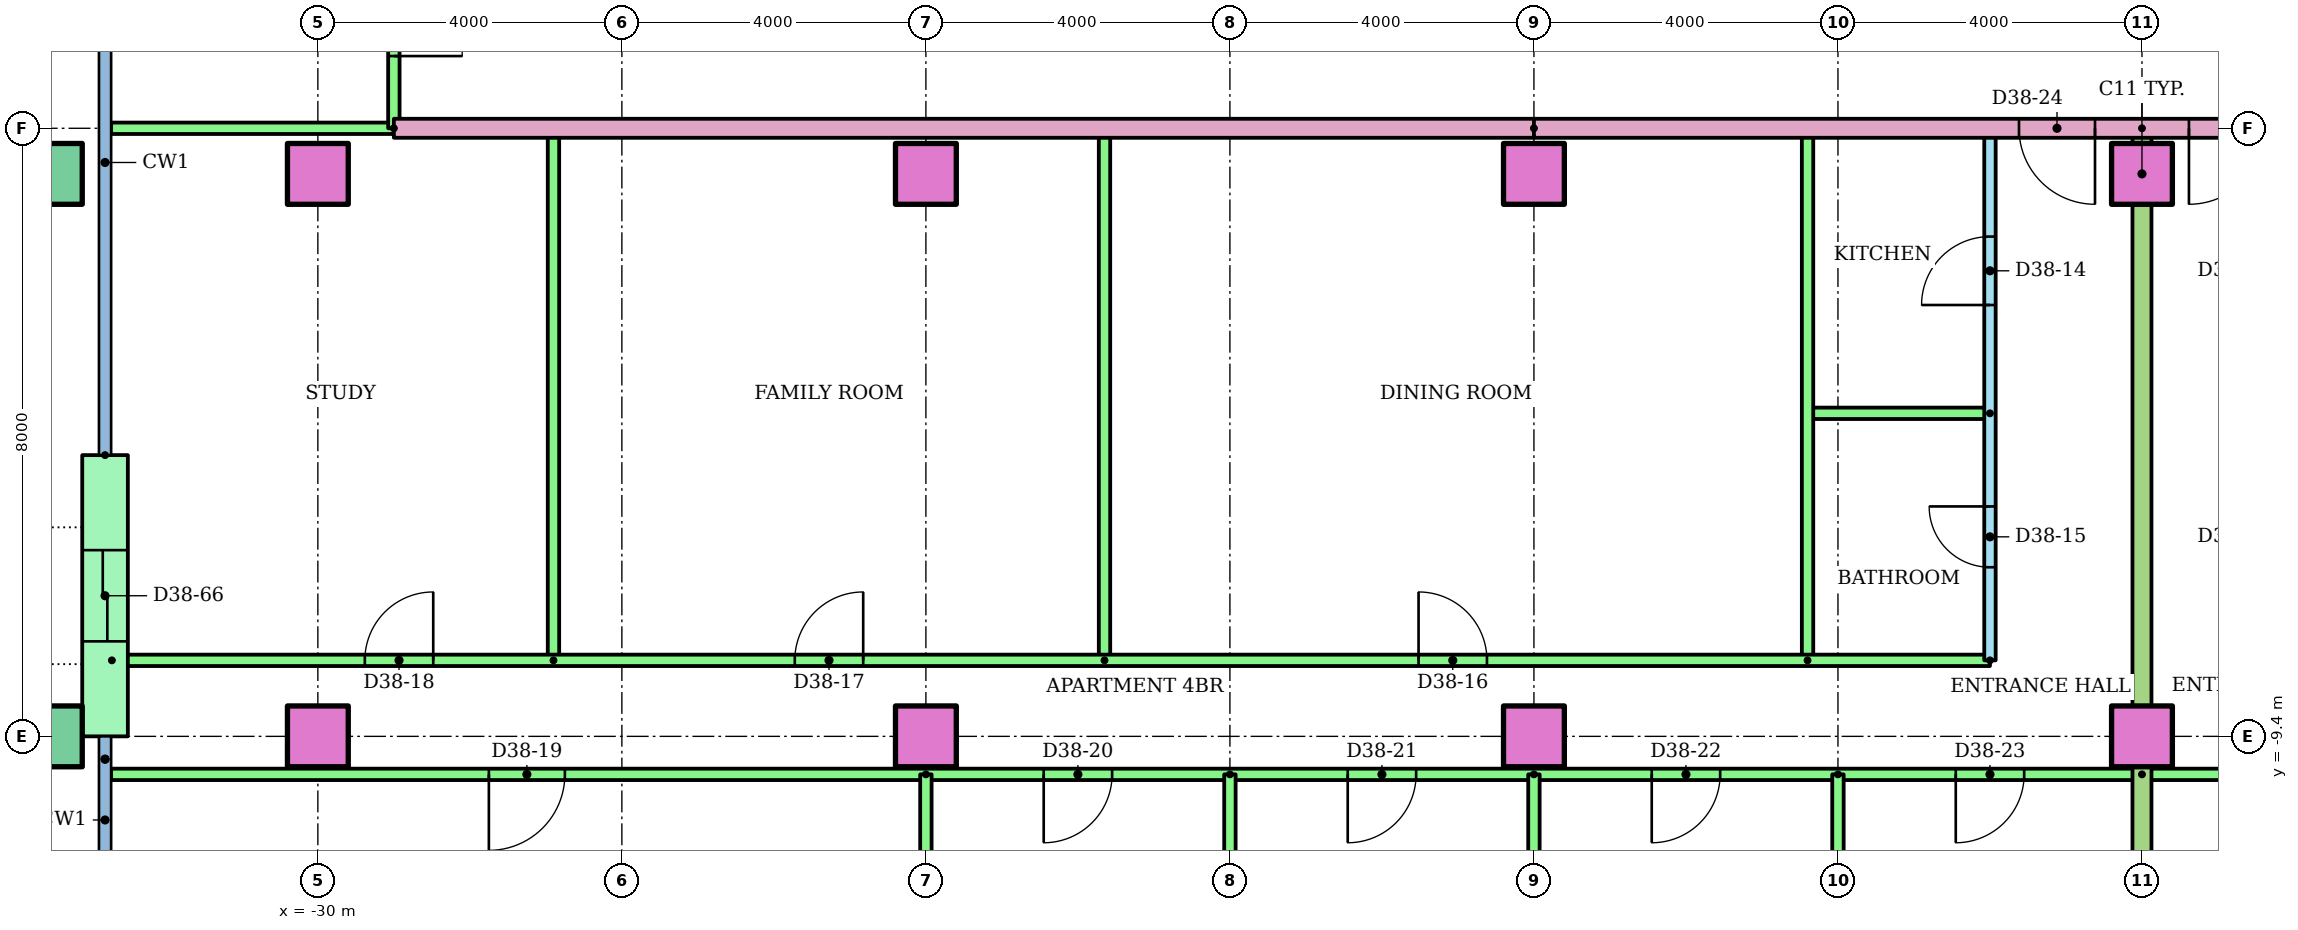
"""IFC4 building model, lengths in metres.
Left out: names, types, materials, properties, quantities, classifications, styles, units other than length and angle.
Written with IfcOpenShell. Run it as: python <this file> out.ifc"""

import sys

from ifc_helpers import new_model, si_unit, direction, frame, frame_2d, origin, origin_2d, place, context, subcontext, project, spatial, rectangle, hollow_rectangle, extrude, element, fill, save


model = new_model("IFC4")
c1 = context("Model", 3, precision=1e-05, world=origin(), true_north=direction((0.0, 1.0)))
c2 = subcontext(c1, "Body", "Model", "MODEL_VIEW")
j1 = project(units=[si_unit("LENGTHUNIT", "METRE"), si_unit("PLANEANGLEUNIT", "RADIAN")], contexts=[c1])
p1 = place(None, origin())
s1 = spatial("IfcSite", under=j1, at=p1, CompositionType="ELEMENT")
p2 = place(p1, origin())
s2 = spatial("IfcBuilding", under=s1, at=p2, CompositionType="ELEMENT")
p3 = place(p2, frame((0.0, 0.0, 145.4)))
s3 = spatial("IfcBuildingStorey", under=s2, at=p3, CompositionType="ELEMENT", Elevation=145.4)
p4 = place(p3, frame((-33.5, -9.4, 0.0)))
e1 = element("IfcColumn", 1, at=p4, inside=s3, PredefinedType="COLUMN", context=c2, shape_type="SweptSolid", body=[
    extrude(hollow_rectangle(XDim=0.8, YDim=0.8, WallThickness=0.04, at=origin_2d()), origin(), (0.0, 0.0, 1.0), 3.2),
])
for number, where in (
    (2, (-30.0, -9.4, 0.0)),
    (3, (-22.0, -9.4, 0.0)),
    (4, (-14.0, -9.4, 0.0)),
    (5, (-6.0, -9.4, 0.0)),
):
    element("IfcColumn", number, at=place(p3, frame(where)), inside=s3, PredefinedType="COLUMN", context=c2, shape_type="SweptSolid", body=[
        extrude(rectangle(XDim=0.8, YDim=0.8, at=origin_2d()), origin(), (0.0, 0.0, 1.0), 3.2),
    ])
p5 = place(p3, frame((-33.5, -2.0, 0.0)))
e6 = element("IfcColumn", 6, at=p5, inside=s3, PredefinedType="COLUMN", context=c2, shape_type="SweptSolid", body=[
    extrude(hollow_rectangle(XDim=0.8, YDim=0.8, WallThickness=0.04, at=origin_2d()), origin(), (0.0, 0.0, 1.0), 3.2),
])
for number, where in (
    (7, (-30.0, -2.0, 0.0)),
    (8, (-22.0, -2.0, 0.0)),
    (9, (-14.0, -2.0, 0.0)),
    (10, (-6.0, -2.0, 0.0)),
):
    element("IfcColumn", number, at=place(p3, frame(where)), inside=s3, PredefinedType="COLUMN", context=c2, shape_type="SweptSolid", body=[
        extrude(rectangle(XDim=0.8, YDim=0.8, at=origin_2d()), origin(), (0.0, 0.0, 1.0), 3.2),
    ])
p6 = place(p3, frame((-32.8, -5.7, 0.0), z_axis=(0.0, 0.0, 1.0), x_axis=(0.0, -1.0, 0.0)))
e11 = element("IfcWall", 11, at=p6, inside=s3, PredefinedType="STANDARD", context=c2, shape_type="SweptSolid", body=[
    extrude(rectangle(XDim=3.7, YDim=0.6, at=frame_2d((1.85, 0.0))), origin(), (0.0, 0.0, 1.0), 2.92),
])
p7 = place(p6, frame((1.25, 0.0, 0.0)))
e12 = element("IfcOpeningElement", 12, at=p7, cuts=e11, PredefinedType="OPENING", context=c2, shape_type="SweptSolid", body=[
    extrude(rectangle(XDim=1.2, YDim=2.1, at=frame_2d((0.6, 1.05))), frame((0.0, 0.31, 0.0), z_axis=(0.0, -1.0, 0.0), x_axis=(1.0, 0.0, 0.0)), (0.0, 0.0, 1.0), 0.62),
])
p8 = place(p3, frame((-8.0, -8.4, 0.0), z_axis=(0.0, 0.0, 1.0), x_axis=(0.0, 1.0, 0.0)))
e13 = element("IfcWall", 13, at=p8, inside=s3, PredefinedType="PARTITIONING", context=c2, shape_type="SweptSolid", body=[
    extrude(rectangle(XDim=7.0, YDim=0.15, at=frame_2d((3.5, 0.0))), origin(), (0.0, 0.0, 1.0), 2.4),
])
p9 = place(p8, frame((4.675, 0.0, 0.0)))
e14 = element("IfcOpeningElement", 14, at=p9, cuts=e13, PredefinedType="OPENING", context=c2, shape_type="SweptSolid", body=[
    extrude(rectangle(XDim=0.9, YDim=2.1, at=frame_2d((0.45, 1.05))), frame((0.0, 0.085, 0.0), z_axis=(0.0, -1.0, 0.0), x_axis=(1.0, 0.0, 0.0)), (0.0, 0.0, 1.0), 0.17),
])
p10 = place(p8, frame((1.225, 0.0, 0.0)))
e15 = element("IfcOpeningElement", 15, at=p10, cuts=e13, PredefinedType="OPENING", context=c2, shape_type="SweptSolid", body=[
    extrude(rectangle(XDim=0.8, YDim=2.1, at=frame_2d((0.4, 1.05))), frame((0.0, 0.085, 0.0), z_axis=(0.0, -1.0, 0.0), x_axis=(1.0, 0.0, 0.0)), (0.0, 0.0, 1.0), 0.17),
])
p11 = place(p3, frame((-8.0, -5.15, 0.0), z_axis=(0.0, 0.0, 1.0), x_axis=(-1.0, 0.0, 0.0)))
e16 = element("IfcWall", 16, at=p11, inside=s3, PredefinedType="PARTITIONING", context=c2, shape_type="SweptSolid", body=[
    extrude(rectangle(XDim=2.4, YDim=0.15, at=frame_2d((1.2, 0.0))), origin(), (0.0, 0.0, 1.0), 2.4),
])
for number, where, z_axis, x_axis in (
    (17, (-10.4, -8.4, 0.0), (0.0, 0.0, 1.0), (0.0, 1.0, 0.0)),
    (18, (-19.65, -8.4, 0.0), (0.0, 0.0, 1.0), (0.0, 1.0, 0.0)),
    (19, (-26.9, -8.4, 0.0), (0.0, 0.0, 1.0), (0.0, 1.0, 0.0)),
):
    element("IfcWall", number, at=place(p3, frame(where, z_axis=z_axis, x_axis=x_axis)), inside=s3, PredefinedType="PARTITIONING", context=c2, shape_type="SweptSolid", body=[
        extrude(rectangle(XDim=7.0, YDim=0.15, at=frame_2d((3.5, 0.0))), origin(), (0.0, 0.0, 1.0), 2.4),
    ])
p12 = place(p3, frame((-32.71, -8.4, 0.0)))
e20 = element("IfcWall", 20, at=p12, inside=s3, PredefinedType="PARTITIONING", context=c2, shape_type="SweptSolid", body=[
    extrude(rectangle(XDim=24.71, YDim=0.15, at=frame_2d((12.355, 0.0))), origin(), (0.0, 0.0, 1.0), 2.4),
])
p13 = place(p12, frame((17.192, 0.0, 0.0)))
e21 = element("IfcOpeningElement", 21, at=p13, cuts=e20, PredefinedType="OPENING", context=c2, shape_type="SweptSolid", body=[
    extrude(rectangle(XDim=0.9, YDim=2.1, at=frame_2d((0.45, 1.05))), frame((0.0, 0.085, 0.0), z_axis=(0.0, -1.0, 0.0), x_axis=(1.0, 0.0, 0.0)), (0.0, 0.0, 1.0), 0.17),
])
p14 = place(p12, frame((8.985, 0.0, 0.0)))
e22 = element("IfcOpeningElement", 22, at=p14, cuts=e20, PredefinedType="OPENING", context=c2, shape_type="SweptSolid", body=[
    extrude(rectangle(XDim=0.9, YDim=2.1, at=frame_2d((0.45, 1.05))), frame((0.0, 0.085, 0.0), z_axis=(0.0, -1.0, 0.0), x_axis=(1.0, 0.0, 0.0)), (0.0, 0.0, 1.0), 0.17),
])
p15 = place(p12, frame((3.328, 0.0, 0.0)))
e23 = element("IfcOpeningElement", 23, at=p15, cuts=e20, PredefinedType="OPENING", context=c2, shape_type="SweptSolid", body=[
    extrude(rectangle(XDim=0.9, YDim=2.1, at=frame_2d((0.45, 1.05))), frame((0.0, 0.085, 0.0), z_axis=(0.0, -1.0, 0.0), x_axis=(1.0, 0.0, 0.0)), (0.0, 0.0, 1.0), 0.17),
])
p16 = place(p3, frame((-6.0, -9.9, 0.0), z_axis=(0.0, 0.0, 1.0), x_axis=(-1.0, 0.0, 0.0)))
e24 = element("IfcWall", 24, at=p16, inside=s3, PredefinedType="PARTITIONING", context=c2, shape_type="SweptSolid", body=[
    extrude(rectangle(XDim=26.72, YDim=0.15, at=frame_2d((13.36, 0.0))), origin(), (0.0, 0.0, 1.0), 2.4),
])
p17 = place(p16, frame((20.75, 0.0, 0.0)))
e25 = element("IfcOpeningElement", 25, at=p17, cuts=e24, PredefinedType="OPENING", context=c2, shape_type="SweptSolid", body=[
    extrude(rectangle(XDim=1.0, YDim=2.1, at=frame_2d((0.5, 1.05))), frame((0.0, 0.085, 0.0), z_axis=(0.0, -1.0, 0.0), x_axis=(1.0, 0.0, 0.0)), (0.0, 0.0, 1.0), 0.17),
])
p18 = place(p16, frame((13.55, 0.0, 0.0)))
e26 = element("IfcOpeningElement", 26, at=p18, cuts=e24, PredefinedType="OPENING", context=c2, shape_type="SweptSolid", body=[
    extrude(rectangle(XDim=0.9, YDim=2.1, at=frame_2d((0.45, 1.05))), frame((0.0, 0.085, 0.0), z_axis=(0.0, -1.0, 0.0), x_axis=(1.0, 0.0, 0.0)), (0.0, 0.0, 1.0), 0.17),
])
p19 = place(p16, frame((9.55, 0.0, 0.0)))
e27 = element("IfcOpeningElement", 27, at=p19, cuts=e24, PredefinedType="OPENING", context=c2, shape_type="SweptSolid", body=[
    extrude(rectangle(XDim=0.9, YDim=2.1, at=frame_2d((0.45, 1.05))), frame((0.0, 0.085, 0.0), z_axis=(0.0, -1.0, 0.0), x_axis=(1.0, 0.0, 0.0)), (0.0, 0.0, 1.0), 0.17),
])
p20 = place(p16, frame((5.55, 0.0, 0.0)))
e28 = element("IfcOpeningElement", 28, at=p20, cuts=e24, PredefinedType="OPENING", context=c2, shape_type="SweptSolid", body=[
    extrude(rectangle(XDim=0.9, YDim=2.1, at=frame_2d((0.45, 1.05))), frame((0.0, 0.085, 0.0), z_axis=(0.0, -1.0, 0.0), x_axis=(1.0, 0.0, 0.0)), (0.0, 0.0, 1.0), 0.17),
])
p21 = place(p16, frame((1.55, 0.0, 0.0)))
e29 = element("IfcOpeningElement", 29, at=p21, cuts=e24, PredefinedType="OPENING", context=c2, shape_type="SweptSolid", body=[
    extrude(rectangle(XDim=0.9, YDim=2.1, at=frame_2d((0.45, 1.05))), frame((0.0, 0.085, 0.0), z_axis=(0.0, -1.0, 0.0), x_axis=(1.0, 0.0, 0.0)), (0.0, 0.0, 1.0), 0.17),
])
p22 = place(p3, frame((-22.0, -9.9, 0.0), z_axis=(0.0, 0.0, 1.0), x_axis=(0.0, -1.0, 0.0)))
e30 = element("IfcWall", 30, at=p22, inside=s3, PredefinedType="PARTITIONING", context=c2, shape_type="SweptSolid", body=[
    extrude(rectangle(XDim=6.41, YDim=0.15, at=frame_2d((3.205, 0.0))), origin(), (0.0, 0.0, 1.0), 2.4),
])
p23 = place(p3, frame((-18.0, -9.9, 0.0), z_axis=(0.0, 0.0, 1.0), x_axis=(0.0, -1.0, 0.0)))
e31 = element("IfcWall", 31, at=p23, inside=s3, PredefinedType="PARTITIONING", context=c2, shape_type="SweptSolid", body=[
    extrude(rectangle(XDim=6.421, YDim=0.15, at=frame_2d((3.21, 0.0))), origin(), (0.0, 0.0, 1.0), 2.4),
])
p24 = place(p3, frame((-14.0, -9.9, 0.0), z_axis=(0.0, 0.0, 1.0), x_axis=(0.0, -1.0, 0.0)))
e32 = element("IfcWall", 32, at=p24, inside=s3, PredefinedType="PARTITIONING", context=c2, shape_type="SweptSolid", body=[
    extrude(rectangle(XDim=6.41, YDim=0.15, at=frame_2d((3.205, 0.0))), origin(), (0.0, 0.0, 1.0), 2.4),
])
p25 = place(p3, frame((-10.0, -9.9, 0.0), z_axis=(0.0, 0.0, 1.0), x_axis=(0.0, -1.0, 0.0)))
e33 = element("IfcWall", 33, at=p25, inside=s3, PredefinedType="PARTITIONING", context=c2, shape_type="SweptSolid", body=[
    extrude(rectangle(XDim=6.421, YDim=0.15, at=frame_2d((3.21, 0.0))), origin(), (0.0, 0.0, 1.0), 2.4),
])
p26 = place(p3, frame((18.0, -9.9, 0.0), z_axis=(0.0, 0.0, 1.0), x_axis=(-1.0, 0.0, 0.0)))
e34 = element("IfcWall", 34, at=p26, inside=s3, PredefinedType="PARTITIONING", context=c2, shape_type="SweptSolid", body=[
    extrude(rectangle(XDim=24.0, YDim=0.15, at=frame_2d((12.0, 0.0))), origin(), (0.0, 0.0, 1.0), 2.4),
])
p27 = place(p26, frame((19.5, 0.0, 0.0)))
e35 = element("IfcOpeningElement", 35, at=p27, cuts=e34, PredefinedType="OPENING", context=c2, shape_type="SweptSolid", body=[
    extrude(rectangle(XDim=1.0, YDim=2.1, at=frame_2d((0.5, 1.05))), frame((0.0, 0.085, 0.0), z_axis=(0.0, -1.0, 0.0), x_axis=(1.0, 0.0, 0.0)), (0.0, 0.0, 1.0), 0.17),
])
p28 = place(p26, frame((13.55, 0.0, 0.0)))
e36 = element("IfcOpeningElement", 36, at=p28, cuts=e34, PredefinedType="OPENING", context=c2, shape_type="SweptSolid", body=[
    extrude(rectangle(XDim=0.9, YDim=2.1, at=frame_2d((0.45, 1.05))), frame((0.0, 0.085, 0.0), z_axis=(0.0, -1.0, 0.0), x_axis=(1.0, 0.0, 0.0)), (0.0, 0.0, 1.0), 0.17),
])
p29 = place(p26, frame((9.55, 0.0, 0.0)))
e37 = element("IfcOpeningElement", 37, at=p29, cuts=e34, PredefinedType="OPENING", context=c2, shape_type="SweptSolid", body=[
    extrude(rectangle(XDim=0.9, YDim=2.1, at=frame_2d((0.45, 1.05))), frame((0.0, 0.085, 0.0), z_axis=(0.0, -1.0, 0.0), x_axis=(1.0, 0.0, 0.0)), (0.0, 0.0, 1.0), 0.17),
])
p30 = place(p26, frame((5.55, 0.0, 0.0)))
e38 = element("IfcOpeningElement", 38, at=p30, cuts=e34, PredefinedType="OPENING", context=c2, shape_type="SweptSolid", body=[
    extrude(rectangle(XDim=0.9, YDim=2.1, at=frame_2d((0.45, 1.05))), frame((0.0, 0.085, 0.0), z_axis=(0.0, -1.0, 0.0), x_axis=(1.0, 0.0, 0.0)), (0.0, 0.0, 1.0), 0.17),
])
p31 = place(p26, frame((1.55, 0.0, 0.0)))
e39 = element("IfcOpeningElement", 39, at=p31, cuts=e34, PredefinedType="OPENING", context=c2, shape_type="SweptSolid", body=[
    extrude(rectangle(XDim=0.9, YDim=2.1, at=frame_2d((0.45, 1.05))), frame((0.0, 0.085, 0.0), z_axis=(0.0, -1.0, 0.0), x_axis=(1.0, 0.0, 0.0)), (0.0, 0.0, 1.0), 0.17),
])
p32 = place(p3, frame((-6.0, -1.4, 0.0), z_axis=(0.0, 0.0, 1.0), x_axis=(0.0, -1.0, 0.0)))
e40 = element("IfcWall", 40, at=p32, inside=s3, PredefinedType="PARTITIONING", context=c2, shape_type="SweptSolid", body=[
    extrude(rectangle(XDim=14.91, YDim=0.25, at=frame_2d((7.455, 0.0))), origin(), (0.0, 0.0, 1.0), 2.4),
])
p33 = place(p3, frame((-14.0, -1.4, 0.0), z_axis=(0.0, 0.0, 1.0), x_axis=(-1.0, 0.0, 0.0)))
e41 = element("IfcWall", 41, at=p33, inside=s3, PredefinedType="PARTITIONING", context=c2, shape_type="SweptSolid", body=[
    extrude(rectangle(XDim=15.0, YDim=0.25, at=frame_2d((7.5, 0.0))), origin(), (0.0, 0.0, 1.0), 2.4),
])
p34 = place(p3, frame((-29.0, -1.4, 0.0), z_axis=(0.0, 0.0, 1.0), x_axis=(-1.0, 0.0, 0.0)))
e42 = element("IfcWall", 42, at=p34, inside=s3, PredefinedType="PARTITIONING", context=c2, shape_type="SweptSolid", body=[
    extrude(rectangle(XDim=3.72, YDim=0.15, at=frame_2d((1.86, 0.0))), origin(), (0.0, 0.0, 1.0), 2.4),
])
p35 = place(p3, frame((-29.0, 1.4, 0.0), z_axis=(0.0, 0.0, 1.0), x_axis=(0.0, -1.0, 0.0)))
e43 = element("IfcWall", 43, at=p35, inside=s3, PredefinedType="PARTITIONING", context=c2, shape_type="SweptSolid", body=[
    extrude(rectangle(XDim=2.8, YDim=0.15, at=frame_2d((1.4, 0.0))), origin(), (0.0, 0.0, 1.0), 2.4),
])
p36 = place(p35, frame((0.95, 0.0, 0.0)))
e44 = element("IfcOpeningElement", 44, at=p36, cuts=e43, PredefinedType="OPENING", context=c2, shape_type="SweptSolid", body=[
    extrude(rectangle(XDim=0.9, YDim=2.1, at=frame_2d((0.45, 1.05))), frame((0.0, 0.085, 0.0), z_axis=(0.0, -1.0, 0.0), x_axis=(1.0, 0.0, 0.0)), (0.0, 0.0, 1.0), 0.17),
])
p37 = place(p3, frame((14.0, -1.4, 0.0), z_axis=(0.0, 0.0, 1.0), x_axis=(-1.0, 0.0, 0.0)))
e45 = element("IfcWall", 45, at=p37, inside=s3, PredefinedType="PARTITIONING", context=c2, shape_type="SweptSolid", body=[
    extrude(rectangle(XDim=28.0, YDim=0.25, at=frame_2d((14.0, 0.0))), origin(), (0.0, 0.0, 1.0), 2.4),
])
p38 = place(p37, frame((20.618, 0.0, 0.0)))
e46 = element("IfcOpeningElement", 46, at=p38, cuts=e45, PredefinedType="OPENING", context=c2, shape_type="SweptSolid", body=[
    extrude(rectangle(XDim=1.0, YDim=2.1, at=frame_2d((0.5, 1.05))), frame((0.0, 0.135, 0.0), z_axis=(0.0, -1.0, 0.0), x_axis=(1.0, 0.0, 0.0)), (0.0, 0.0, 1.0), 0.27),
])
p39 = place(p37, frame((18.382, 0.0, 0.0)))
e47 = element("IfcOpeningElement", 47, at=p39, cuts=e45, PredefinedType="OPENING", context=c2, shape_type="SweptSolid", body=[
    extrude(rectangle(XDim=1.0, YDim=2.1, at=frame_2d((0.5, 1.05))), frame((0.0, 0.135, 0.0), z_axis=(0.0, -1.0, 0.0), x_axis=(1.0, 0.0, 0.0)), (0.0, 0.0, 1.0), 0.27),
])
p40 = place(p9, origin())
e48 = element("IfcDoor", 48, at=p40, inside=s3, OperationType="SINGLE_SWING_LEFT", PredefinedType="DOOR", context=c2, shape_type="SweptSolid", body=[
    extrude(rectangle(XDim=0.9, YDim=2.1, at=frame_2d((0.45, 1.05))), frame((0.0, 0.025, 0.0), z_axis=(0.0, -1.0, 0.0), x_axis=(1.0, 0.0, 0.0)), (0.0, 0.0, 1.0), 0.05),
])
fill(e14, e48)
p41 = place(p10, origin())
e49 = element("IfcDoor", 49, at=p41, inside=s3, OperationType="SINGLE_SWING_RIGHT", PredefinedType="DOOR", context=c2, shape_type="SweptSolid", body=[
    extrude(rectangle(XDim=0.8, YDim=2.1, at=frame_2d((0.4, 1.05))), frame((0.0, 0.025, 0.0), z_axis=(0.0, -1.0, 0.0), x_axis=(1.0, 0.0, 0.0)), (0.0, 0.0, 1.0), 0.05),
])
fill(e15, e49)
p42 = place(p13, origin())
e50 = element("IfcDoor", 50, at=p42, inside=s3, OperationType="SINGLE_SWING_LEFT", PredefinedType="DOOR", context=c2, shape_type="SweptSolid", body=[
    extrude(rectangle(XDim=0.9, YDim=2.1, at=frame_2d((0.45, 1.05))), frame((0.0, 0.025, 0.0), z_axis=(0.0, -1.0, 0.0), x_axis=(1.0, 0.0, 0.0)), (0.0, 0.0, 1.0), 0.05),
])
fill(e21, e50)
p43 = place(p14, origin())
e51 = element("IfcDoor", 51, at=p43, inside=s3, OperationType="SINGLE_SWING_RIGHT", PredefinedType="DOOR", context=c2, shape_type="SweptSolid", body=[
    extrude(rectangle(XDim=0.9, YDim=2.1, at=frame_2d((0.45, 1.05))), frame((0.0, 0.025, 0.0), z_axis=(0.0, -1.0, 0.0), x_axis=(1.0, 0.0, 0.0)), (0.0, 0.0, 1.0), 0.05),
])
fill(e22, e51)
p44 = place(p15, origin())
e52 = element("IfcDoor", 52, at=p44, inside=s3, OperationType="SINGLE_SWING_RIGHT", PredefinedType="DOOR", context=c2, shape_type="SweptSolid", body=[
    extrude(rectangle(XDim=0.9, YDim=2.1, at=frame_2d((0.45, 1.05))), frame((0.0, 0.025, 0.0), z_axis=(0.0, -1.0, 0.0), x_axis=(1.0, 0.0, 0.0)), (0.0, 0.0, 1.0), 0.05),
])
fill(e23, e52)
p45 = place(p17, origin())
e53 = element("IfcDoor", 53, at=p45, inside=s3, OperationType="SINGLE_SWING_RIGHT", PredefinedType="DOOR", context=c2, shape_type="SweptSolid", body=[
    extrude(rectangle(XDim=1.0, YDim=2.1, at=frame_2d((0.5, 1.05))), frame((0.0, 0.025, 0.0), z_axis=(0.0, -1.0, 0.0), x_axis=(1.0, 0.0, 0.0)), (0.0, 0.0, 1.0), 0.05),
])
fill(e25, e53)
p46 = place(p18, origin())
e54 = element("IfcDoor", 54, at=p46, inside=s3, OperationType="SINGLE_SWING_RIGHT", PredefinedType="DOOR", context=c2, shape_type="SweptSolid", body=[
    extrude(rectangle(XDim=0.9, YDim=2.1, at=frame_2d((0.45, 1.05))), frame((0.0, 0.025, 0.0), z_axis=(0.0, -1.0, 0.0), x_axis=(1.0, 0.0, 0.0)), (0.0, 0.0, 1.0), 0.05),
])
fill(e26, e54)
p47 = place(p19, origin())
e55 = element("IfcDoor", 55, at=p47, inside=s3, OperationType="SINGLE_SWING_RIGHT", PredefinedType="DOOR", context=c2, shape_type="SweptSolid", body=[
    extrude(rectangle(XDim=0.9, YDim=2.1, at=frame_2d((0.45, 1.05))), frame((0.0, 0.025, 0.0), z_axis=(0.0, -1.0, 0.0), x_axis=(1.0, 0.0, 0.0)), (0.0, 0.0, 1.0), 0.05),
])
fill(e27, e55)
p48 = place(p20, origin())
e56 = element("IfcDoor", 56, at=p48, inside=s3, OperationType="SINGLE_SWING_RIGHT", PredefinedType="DOOR", context=c2, shape_type="SweptSolid", body=[
    extrude(rectangle(XDim=0.9, YDim=2.1, at=frame_2d((0.45, 1.05))), frame((0.0, 0.025, 0.0), z_axis=(0.0, -1.0, 0.0), x_axis=(1.0, 0.0, 0.0)), (0.0, 0.0, 1.0), 0.05),
])
fill(e28, e56)
p49 = place(p21, origin())
e57 = element("IfcDoor", 57, at=p49, inside=s3, OperationType="SINGLE_SWING_RIGHT", PredefinedType="DOOR", context=c2, shape_type="SweptSolid", body=[
    extrude(rectangle(XDim=0.9, YDim=2.1, at=frame_2d((0.45, 1.05))), frame((0.0, 0.025, 0.0), z_axis=(0.0, -1.0, 0.0), x_axis=(1.0, 0.0, 0.0)), (0.0, 0.0, 1.0), 0.05),
])
fill(e29, e57)
p50 = place(p38, origin())
e58 = element("IfcDoor", 58, at=p50, inside=s3, OperationType="SINGLE_SWING_LEFT", PredefinedType="DOOR", context=c2, shape_type="SweptSolid", body=[
    extrude(rectangle(XDim=1.0, YDim=2.1, at=frame_2d((0.5, 1.05))), frame((0.0, 0.025, 0.0), z_axis=(0.0, -1.0, 0.0), x_axis=(1.0, 0.0, 0.0)), (0.0, 0.0, 1.0), 0.05),
])
fill(e46, e58)
p51 = place(p39, origin())
e59 = element("IfcDoor", 59, at=p51, inside=s3, OperationType="SINGLE_SWING_RIGHT", PredefinedType="DOOR", context=c2, shape_type="SweptSolid", body=[
    extrude(rectangle(XDim=1.0, YDim=2.1, at=frame_2d((0.5, 1.05))), frame((0.0, 0.025, 0.0), z_axis=(0.0, -1.0, 0.0), x_axis=(1.0, 0.0, 0.0)), (0.0, 0.0, 1.0), 0.05),
])
fill(e47, e59)
p52 = place(p36, origin())
e60 = element("IfcDoor", 60, at=p52, inside=s3, OperationType="SINGLE_SWING_RIGHT", PredefinedType="DOOR", context=c2, shape_type="SweptSolid", body=[
    extrude(rectangle(XDim=0.9, YDim=2.1, at=frame_2d((0.45, 1.05))), frame((0.0, 0.025, 0.0), z_axis=(0.0, -1.0, 0.0), x_axis=(1.0, 0.0, 0.0)), (0.0, 0.0, 1.0), 0.05),
])
fill(e44, e60)
p53 = place(p7, origin())
e61 = element("IfcDoor", 61, at=p53, inside=s3, OperationType="SLIDING_TO_LEFT", PredefinedType="DOOR", context=c2, shape_type="SweptSolid", body=[
    extrude(rectangle(XDim=1.2, YDim=2.1, at=frame_2d((0.6, 1.05))), frame((0.0, 0.025, 0.0), z_axis=(0.0, -1.0, 0.0), x_axis=(1.0, 0.0, 0.0)), (0.0, 0.0, 1.0), 0.05),
])
fill(e12, e61)
save(model, sys.argv[1])
